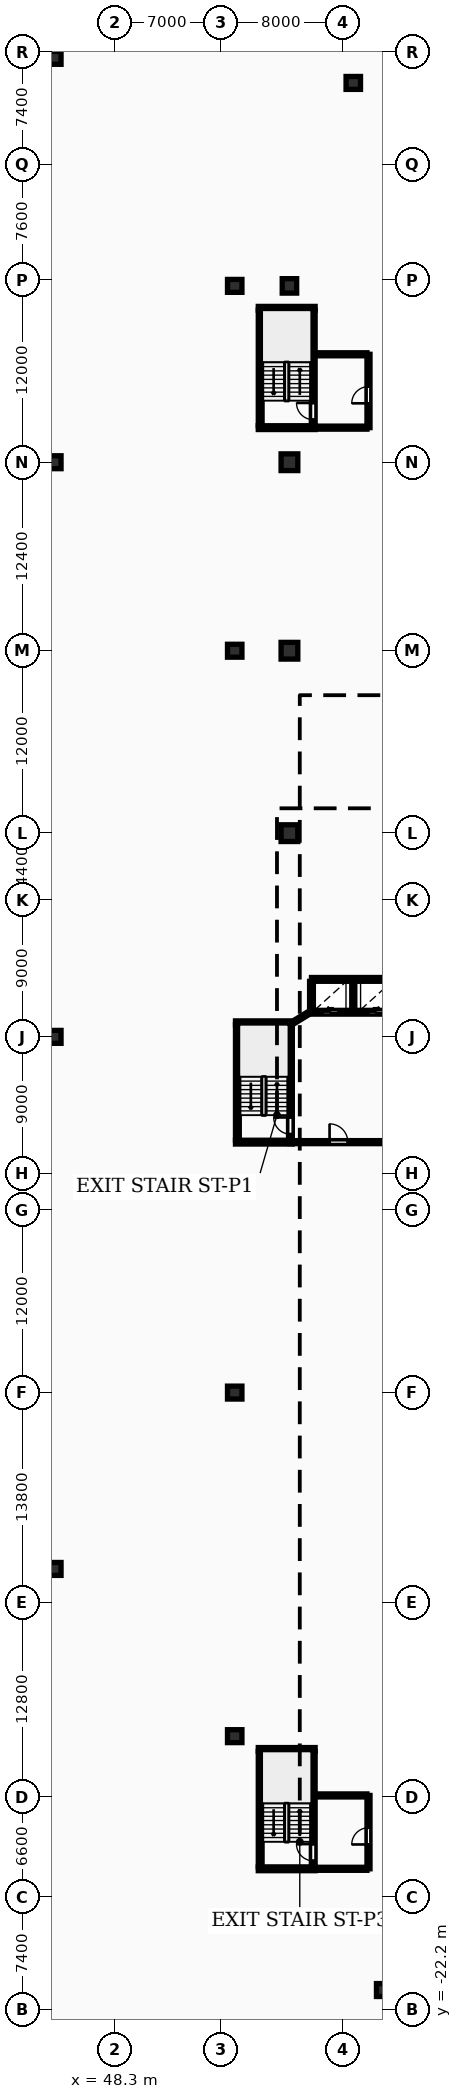
"""IFC4 building model, lengths in metres.
Left out: names, types, materials, properties, quantities, classifications, styles, units other than length and angle.
Written with IfcOpenShell. Run it as: python <this file> out.ifc"""

import sys

from ifc_helpers import new_model, si_unit, direction, frame, frame_2d, origin, origin_2d, place, context, subcontext, project, spatial, rectangle, circle, extrude, element, fill, save


model = new_model("IFC4")
c1 = context("Model", 3, precision=1e-05, world=origin(), true_north=direction((0.0, 1.0)))
c2 = subcontext(c1, "Body", "Model", "MODEL_VIEW")
j1 = project(units=[si_unit("LENGTHUNIT", "METRE"), si_unit("PLANEANGLEUNIT", "RADIAN")], contexts=[c1])
p1 = place(None, origin())
s1 = spatial("IfcSite", under=j1, at=p1, CompositionType="ELEMENT")
p2 = place(p1, origin())
s2 = spatial("IfcBuilding", under=s1, at=p2, CompositionType="ELEMENT")
p3 = place(p2, frame((0.0, 0.0, -3.6)))
s3 = spatial("IfcBuildingStorey", under=s2, at=p3, CompositionType="ELEMENT", Elevation=-3.6)
for number, where, z_axis, x_axis in (
    (1, (59.8, 55.2, 0.0), (0.0, 0.0, 1.0), (1.0, 0.0, 0.0)),
    (2, (59.8, 67.2, 0.0), (0.0, 0.0, 1.0), (1.0, 0.0, 0.0)),
    (3, (59.8, 79.6, 0.0), (0.0, 0.0, 1.0), (1.0, 0.0, 0.0)),
):
    element("IfcColumn", number, at=place(p3, frame(where, z_axis=z_axis, x_axis=x_axis)), inside=s3, PredefinedType="COLUMN", context=c2, shape_type="SweptSolid", body=[
        extrude(rectangle(XDim=1.1, YDim=1.1, at=origin_2d()), origin(), (0.0, 0.0, 1.0), 3.6),
    ])
p4 = place(p3, frame((59.8, 91.2, 0.0), z_axis=(0.0, 0.0, 1.0), x_axis=(1.0, 0.0, 0.0)))
e4 = element("IfcColumn", 4, at=p4, inside=s3, PredefinedType="COLUMN", context=c2, shape_type="SweptSolid", body=[
    extrude(circle(Radius=0.475, at=origin_2d()), origin(), (0.0, 0.0, 1.0), 3.6),
])
for number, where, z_axis, x_axis in (
    (5, (56.2, -4.2, 0.0), (0.0, 0.0, 1.0), (1.0, 0.0, 0.0)),
    (6, (56.2, 18.4, 0.0), (0.0, 0.0, 1.0), (1.0, 0.0, 0.0)),
    (7, (56.2, 67.2, 0.0), (0.0, 0.0, 1.0), (1.0, 0.0, 0.0)),
    (8, (56.2, 91.2, 0.0), (0.0, 0.0, 1.0), (1.0, 0.0, 0.0)),
    (9, (66.0, -20.9, 0.0), (0.0, 0.0, 1.0), (1.0, 0.0, 0.0)),
    (10, (64.0, 104.55, 0.0), (0.0, 0.0, 1.0), (1.0, 0.0, 0.0)),
    (11, (44.3, 6.8, 0.0), (0.0, 0.0, 1.0), (1.0, 0.0, 0.0)),
    (12, (44.3, 41.8, 0.0), (0.0, 0.0, 1.0), (1.0, 0.0, 0.0)),
    (13, (44.3, 79.6, 0.0), (0.0, 0.0, 1.0), (1.0, 0.0, 0.0)),
    (14, (44.3, 106.2, 0.0), (0.0, 0.0, 1.0), (1.0, 0.0, 0.0)),
):
    element("IfcColumn", number, at=place(p3, frame(where, z_axis=z_axis, x_axis=x_axis)), inside=s3, PredefinedType="COLUMN", context=c2, shape_type="SweptSolid", body=[
        extrude(rectangle(XDim=0.95, YDim=0.85, at=origin_2d()), origin(), (0.0, 0.0, 1.0), 3.6),
    ])
p5 = place(p3, frame((56.375, 35.0, 0.0), z_axis=(0.0, 0.0, 1.0), x_axis=(0.0, 1.0, 0.0)))
e15 = element("IfcWall", 15, at=p5, inside=s3, PredefinedType="SHEAR", context=c2, shape_type="SweptSolid", body=[
    extrude(rectangle(XDim=7.6, YDim=0.25, at=frame_2d((3.8, 0.0))), origin(), (0.0, 0.0, 1.0), 3.6),
])
for number, where, z_axis, x_axis in (
    (16, (56.25, 42.725, 0.0), (0.0, 0.0, 1.0), (1.0, 0.0, 0.0)),
    (17, (56.25, 34.875, 0.0), (0.0, 0.0, 1.0), (1.0, 0.0, 0.0)),
):
    element("IfcWall", number, at=place(p3, frame(where, z_axis=z_axis, x_axis=x_axis)), inside=s3, PredefinedType="SHEAR", context=c2, shape_type="SweptSolid", body=[
        extrude(rectangle(XDim=3.74, YDim=0.25, at=frame_2d((1.87, 0.0))), origin(), (0.0, 0.0, 1.0), 3.6),
    ])
p6 = place(p3, frame((59.865, 35.0, 0.0), z_axis=(0.0, 0.0, 1.0), x_axis=(0.0, 1.0, 0.0)))
e18 = element("IfcWall", 18, at=p6, inside=s3, PredefinedType="SHEAR", context=c2, shape_type="SweptSolid", body=[
    extrude(rectangle(XDim=7.6, YDim=0.25, at=frame_2d((3.8, 0.0))), origin(), (0.0, 0.0, 1.0), 3.6),
])
p7 = place(p6, frame((0.4, 0.0, 0.0)))
e19 = element("IfcOpeningElement", 19, at=p7, cuts=e18, PredefinedType="OPENING", context=c2, shape_type="SweptSolid", body=[
    extrude(rectangle(XDim=1.1, YDim=2.1, at=frame_2d((0.55, 1.05))), frame((0.0, 0.135, 0.0), z_axis=(0.0, -1.0, 0.0), x_axis=(1.0, 0.0, 0.0)), (0.0, 0.0, 1.0), 0.27),
])
p8 = place(p3, frame((61.25, 43.42, 0.0), z_axis=(0.0, 0.0, 1.0), x_axis=(1.0, 0.0, 0.0)))
e20 = element("IfcWall", 20, at=p8, inside=s3, PredefinedType="SHEAR", context=c2, shape_type="SweptSolid", body=[
    extrude(rectangle(XDim=5.5, YDim=0.25, at=frame_2d((2.75, 0.0))), origin(), (0.0, 0.0, 1.0), 3.6),
])
p9 = place(p8, frame((0.74, 0.0, 0.0)))
e21 = element("IfcOpeningElement", 21, at=p9, cuts=e20, PredefinedType="OPENING", context=c2, shape_type="SweptSolid", body=[
    extrude(rectangle(XDim=1.02, YDim=2.12, at=frame_2d((0.51, 1.06))), frame((0.0, 0.135, 0.0), z_axis=(0.0, -1.0, 0.0), x_axis=(1.0, 0.0, 0.0)), (0.0, 0.0, 1.0), 0.27),
])
p10 = place(p8, frame((3.74, 0.0, 0.0)))
e22 = element("IfcOpeningElement", 22, at=p10, cuts=e20, PredefinedType="OPENING", context=c2, shape_type="SweptSolid", body=[
    extrude(rectangle(XDim=1.02, YDim=2.12, at=frame_2d((0.51, 1.06))), frame((0.0, 0.135, 0.0), z_axis=(0.0, -1.0, 0.0), x_axis=(1.0, 0.0, 0.0)), (0.0, 0.0, 1.0), 0.27),
])
p11 = place(p3, frame((61.25, 45.58, 0.0), z_axis=(0.0, 0.0, 1.0), x_axis=(1.0, 0.0, 0.0)))
e23 = element("IfcWall", 23, at=p11, inside=s3, PredefinedType="SHEAR", context=c2, shape_type="SweptSolid", body=[
    extrude(rectangle(XDim=5.5, YDim=0.25, at=frame_2d((2.75, 0.0))), origin(), (0.0, 0.0, 1.0), 3.6),
])
p12 = place(p3, frame((61.25, 43.55, 0.0), z_axis=(0.0, 0.0, 1.0), x_axis=(0.0, 1.0, 0.0)))
e24 = element("IfcWall", 24, at=p12, inside=s3, PredefinedType="SHEAR", context=c2, shape_type="SweptSolid", body=[
    extrude(rectangle(XDim=1.9, YDim=0.25, at=frame_2d((0.95, 0.0))), origin(), (0.0, 0.0, 1.0), 3.6),
])
p13 = place(p3, frame((64.0, 43.55, 0.0), z_axis=(0.0, 0.0, 1.0), x_axis=(0.0, 1.0, 0.0)))
e25 = element("IfcWall", 25, at=p13, inside=s3, PredefinedType="PARTITIONING", context=c2, shape_type="SweptSolid", body=[
    extrude(rectangle(XDim=1.9, YDim=0.2, at=frame_2d((0.95, 0.0))), origin(), (0.0, 0.0, 1.0), 3.3),
])
p14 = place(p3, frame((59.84, 34.875, 0.0), z_axis=(0.0, 0.0, 1.0), x_axis=(1.0, 0.0, 0.0)))
e26 = element("IfcWall", 26, at=p14, inside=s3, PredefinedType="PARTITIONING", context=c2, shape_type="SweptSolid", body=[
    extrude(rectangle(XDim=6.96, YDim=0.2, at=frame_2d((3.48, 0.0))), origin(), (0.0, 0.0, 1.0), 3.3),
])
p15 = place(p14, frame((2.6, 0.0, 0.0)))
e27 = element("IfcOpeningElement", 27, at=p15, cuts=e26, PredefinedType="OPENING", context=c2, shape_type="SweptSolid", body=[
    extrude(rectangle(XDim=1.2, YDim=2.18, at=frame_2d((0.6, 1.09))), frame((0.0, 0.11, 0.0), z_axis=(0.0, -1.0, 0.0), x_axis=(1.0, 0.0, 0.0)), (0.0, 0.0, 1.0), 0.22),
])
p16 = place(p3, frame((60.02, 42.725, 0.0), z_axis=(0.0, 0.0, 1.0), x_axis=(0.851822584555, 0.523830396638, 0.0)))
e28 = element("IfcWall", 28, at=p16, inside=s3, PredefinedType="PARTITIONING", context=c2, shape_type="SweptSolid", body=[
    extrude(rectangle(XDim=1.326, YDim=0.2, at=frame_2d((0.663, 0.0))), origin(), (0.0, 0.0, 1.0), 3.3),
])
p17 = place(p3, frame((57.875, -12.8, 0.0), z_axis=(0.0, 0.0, 1.0), x_axis=(0.0, 1.0, 0.0)))
e29 = element("IfcWall", 29, at=p17, inside=s3, PredefinedType="SHEAR", context=c2, shape_type="SweptSolid", body=[
    extrude(rectangle(XDim=7.6, YDim=0.25, at=frame_2d((3.8, 0.0))), origin(), (0.0, 0.0, 1.0), 3.6),
])
for number, where, z_axis, x_axis in (
    (30, (57.75, -12.925, 0.0), (0.0, 0.0, 1.0), (1.0, 0.0, 0.0)),
    (31, (57.75, -5.075, 0.0), (0.0, 0.0, 1.0), (1.0, 0.0, 0.0)),
):
    element("IfcWall", number, at=place(p3, frame(where, z_axis=z_axis, x_axis=x_axis)), inside=s3, PredefinedType="SHEAR", context=c2, shape_type="SweptSolid", body=[
        extrude(rectangle(XDim=3.74, YDim=0.25, at=frame_2d((1.87, 0.0))), origin(), (0.0, 0.0, 1.0), 3.6),
    ])
p18 = place(p3, frame((61.365, -12.8, 0.0), z_axis=(0.0, 0.0, 1.0), x_axis=(0.0, 1.0, 0.0)))
e32 = element("IfcWall", 32, at=p18, inside=s3, PredefinedType="SHEAR", context=c2, shape_type="SweptSolid", body=[
    extrude(rectangle(XDim=7.6, YDim=0.25, at=frame_2d((3.8, 0.0))), origin(), (0.0, 0.0, 1.0), 3.6),
])
p19 = place(p18, frame((0.4, 0.0, 0.0)))
e33 = element("IfcOpeningElement", 33, at=p19, cuts=e32, PredefinedType="OPENING", context=c2, shape_type="SweptSolid", body=[
    extrude(rectangle(XDim=1.1, YDim=2.1, at=frame_2d((0.55, 1.05))), frame((0.0, 0.135, 0.0), z_axis=(0.0, -1.0, 0.0), x_axis=(1.0, 0.0, 0.0)), (0.0, 0.0, 1.0), 0.27),
])
p20 = place(p3, frame((65.0, -12.925, 0.0), z_axis=(0.0, 0.0, 1.0), x_axis=(0.0, 1.0, 0.0)))
e34 = element("IfcWall", 34, at=p20, inside=s3, PredefinedType="PARTITIONING", context=c2, shape_type="SweptSolid", body=[
    extrude(rectangle(XDim=4.825, YDim=0.2, at=frame_2d((2.413, 0.0))), origin(), (0.0, 0.0, 1.0), 3.3),
])
p21 = place(p20, frame((1.6, 0.0, 0.0)))
e35 = element("IfcOpeningElement", 35, at=p21, cuts=e34, PredefinedType="OPENING", context=c2, shape_type="SweptSolid", body=[
    extrude(rectangle(XDim=1.1, YDim=2.15, at=frame_2d((0.55, 1.075))), frame((0.0, 0.11, 0.0), z_axis=(0.0, -1.0, 0.0), x_axis=(1.0, 0.0, 0.0)), (0.0, 0.0, 1.0), 0.22),
])
for number, where, z_axis, x_axis in (
    (36, (61.5, -12.925, 0.0), (0.0, 0.0, 1.0), (1.0, 0.0, 0.0)),
    (37, (61.5, -8.1, 0.0), (0.0, 0.0, 1.0), (1.0, 0.0, 0.0)),
):
    element("IfcWall", number, at=place(p3, frame(where, z_axis=z_axis, x_axis=x_axis)), inside=s3, PredefinedType="PARTITIONING", context=c2, shape_type="SweptSolid", body=[
        extrude(rectangle(XDim=3.4, YDim=0.2, at=frame_2d((1.7, 0.0))), origin(), (0.0, 0.0, 1.0), 3.3),
    ])
p22 = place(p3, frame((57.875, 82.0, 0.0), z_axis=(0.0, 0.0, 1.0), x_axis=(0.0, 1.0, 0.0)))
e38 = element("IfcWall", 38, at=p22, inside=s3, PredefinedType="SHEAR", context=c2, shape_type="SweptSolid", body=[
    extrude(rectangle(XDim=7.6, YDim=0.25, at=frame_2d((3.8, 0.0))), origin(), (0.0, 0.0, 1.0), 3.6),
])
for number, where, z_axis, x_axis in (
    (39, (57.75, 81.875, 0.0), (0.0, 0.0, 1.0), (1.0, 0.0, 0.0)),
    (40, (57.75, 89.725, 0.0), (0.0, 0.0, 1.0), (1.0, 0.0, 0.0)),
):
    element("IfcWall", number, at=place(p3, frame(where, z_axis=z_axis, x_axis=x_axis)), inside=s3, PredefinedType="SHEAR", context=c2, shape_type="SweptSolid", body=[
        extrude(rectangle(XDim=3.74, YDim=0.25, at=frame_2d((1.87, 0.0))), origin(), (0.0, 0.0, 1.0), 3.6),
    ])
p23 = place(p3, frame((61.365, 82.0, 0.0), z_axis=(0.0, 0.0, 1.0), x_axis=(0.0, 1.0, 0.0)))
e41 = element("IfcWall", 41, at=p23, inside=s3, PredefinedType="SHEAR", context=c2, shape_type="SweptSolid", body=[
    extrude(rectangle(XDim=7.6, YDim=0.25, at=frame_2d((3.8, 0.0))), origin(), (0.0, 0.0, 1.0), 3.6),
])
p24 = place(p23, frame((0.4, 0.0, 0.0)))
e42 = element("IfcOpeningElement", 42, at=p24, cuts=e41, PredefinedType="OPENING", context=c2, shape_type="SweptSolid", body=[
    extrude(rectangle(XDim=1.1, YDim=2.1, at=frame_2d((0.55, 1.05))), frame((0.0, 0.135, 0.0), z_axis=(0.0, -1.0, 0.0), x_axis=(1.0, 0.0, 0.0)), (0.0, 0.0, 1.0), 0.27),
])
p25 = place(p3, frame((65.0, 81.875, 0.0), z_axis=(0.0, 0.0, 1.0), x_axis=(0.0, 1.0, 0.0)))
e43 = element("IfcWall", 43, at=p25, inside=s3, PredefinedType="PARTITIONING", context=c2, shape_type="SweptSolid", body=[
    extrude(rectangle(XDim=4.825, YDim=0.2, at=frame_2d((2.413, 0.0))), origin(), (0.0, 0.0, 1.0), 3.3),
])
p26 = place(p25, frame((1.6, 0.0, 0.0)))
e44 = element("IfcOpeningElement", 44, at=p26, cuts=e43, PredefinedType="OPENING", context=c2, shape_type="SweptSolid", body=[
    extrude(rectangle(XDim=1.1, YDim=2.15, at=frame_2d((0.55, 1.075))), frame((0.0, 0.11, 0.0), z_axis=(0.0, -1.0, 0.0), x_axis=(1.0, 0.0, 0.0)), (0.0, 0.0, 1.0), 0.22),
])
for number, where, z_axis, x_axis in (
    (45, (61.5, 81.875, 0.0), (0.0, 0.0, 1.0), (1.0, 0.0, 0.0)),
    (46, (61.5, 86.7, 0.0), (0.0, 0.0, 1.0), (1.0, 0.0, 0.0)),
):
    element("IfcWall", number, at=place(p3, frame(where, z_axis=z_axis, x_axis=x_axis)), inside=s3, PredefinedType="PARTITIONING", context=c2, shape_type="SweptSolid", body=[
        extrude(rectangle(XDim=3.4, YDim=0.2, at=frame_2d((1.7, 0.0))), origin(), (0.0, 0.0, 1.0), 3.3),
    ])
p27 = place(p7, origin())
e47 = element("IfcDoor", 47, at=p27, inside=s3, OperationType="SINGLE_SWING_RIGHT", PredefinedType="DOOR", context=c2, shape_type="SweptSolid", body=[
    extrude(rectangle(XDim=1.1, YDim=2.1, at=frame_2d((0.55, 1.05))), frame((0.0, 0.025, 0.0), z_axis=(0.0, -1.0, 0.0), x_axis=(1.0, 0.0, 0.0)), (0.0, 0.0, 1.0), 0.05),
])
fill(e19, e47)
p28 = place(p9, origin())
e48 = element("IfcDoor", 48, at=p28, inside=s3, OperationType="SLIDING_TO_LEFT", PredefinedType="DOOR", context=c2, shape_type="SweptSolid", body=[
    extrude(rectangle(XDim=1.02, YDim=2.12, at=frame_2d((0.51, 1.06))), frame((0.0, 0.025, 0.0), z_axis=(0.0, -1.0, 0.0), x_axis=(1.0, 0.0, 0.0)), (0.0, 0.0, 1.0), 0.05),
])
fill(e21, e48)
p29 = place(p10, origin())
e49 = element("IfcDoor", 49, at=p29, inside=s3, OperationType="SLIDING_TO_RIGHT", PredefinedType="DOOR", context=c2, shape_type="SweptSolid", body=[
    extrude(rectangle(XDim=1.02, YDim=2.12, at=frame_2d((0.51, 1.06))), frame((0.0, 0.025, 0.0), z_axis=(0.0, -1.0, 0.0), x_axis=(1.0, 0.0, 0.0)), (0.0, 0.0, 1.0), 0.05),
])
fill(e22, e49)
p30 = place(p15, origin())
e50 = element("IfcDoor", 50, at=p30, inside=s3, OperationType="SINGLE_SWING_LEFT", PredefinedType="DOOR", context=c2, shape_type="SweptSolid", body=[
    extrude(rectangle(XDim=1.2, YDim=2.18, at=frame_2d((0.6, 1.09))), frame((0.0, 0.025, 0.0), z_axis=(0.0, -1.0, 0.0), x_axis=(1.0, 0.0, 0.0)), (0.0, 0.0, 1.0), 0.05),
])
fill(e27, e50)
p31 = place(p19, origin())
e51 = element("IfcDoor", 51, at=p31, inside=s3, OperationType="SINGLE_SWING_RIGHT", PredefinedType="DOOR", context=c2, shape_type="SweptSolid", body=[
    extrude(rectangle(XDim=1.1, YDim=2.1, at=frame_2d((0.55, 1.05))), frame((0.0, 0.025, 0.0), z_axis=(0.0, -1.0, 0.0), x_axis=(1.0, 0.0, 0.0)), (0.0, 0.0, 1.0), 0.05),
])
fill(e33, e51)
p32 = place(p21, origin())
e52 = element("IfcDoor", 52, at=p32, inside=s3, OperationType="SINGLE_SWING_LEFT", PredefinedType="DOOR", context=c2, shape_type="SweptSolid", body=[
    extrude(rectangle(XDim=1.1, YDim=2.15, at=frame_2d((0.55, 1.075))), frame((0.0, 0.025, 0.0), z_axis=(0.0, -1.0, 0.0), x_axis=(1.0, 0.0, 0.0)), (0.0, 0.0, 1.0), 0.05),
])
fill(e35, e52)
p33 = place(p24, origin())
e53 = element("IfcDoor", 53, at=p33, inside=s3, OperationType="SINGLE_SWING_RIGHT", PredefinedType="DOOR", context=c2, shape_type="SweptSolid", body=[
    extrude(rectangle(XDim=1.1, YDim=2.1, at=frame_2d((0.55, 1.05))), frame((0.0, 0.025, 0.0), z_axis=(0.0, -1.0, 0.0), x_axis=(1.0, 0.0, 0.0)), (0.0, 0.0, 1.0), 0.05),
])
fill(e42, e53)
p34 = place(p26, origin())
e54 = element("IfcDoor", 54, at=p34, inside=s3, OperationType="SINGLE_SWING_LEFT", PredefinedType="DOOR", context=c2, shape_type="SweptSolid", body=[
    extrude(rectangle(XDim=1.1, YDim=2.15, at=frame_2d((0.55, 1.075))), frame((0.0, 0.025, 0.0), z_axis=(0.0, -1.0, 0.0), x_axis=(1.0, 0.0, 0.0)), (0.0, 0.0, 1.0), 0.05),
])
fill(e44, e54)
save(model, sys.argv[1])
